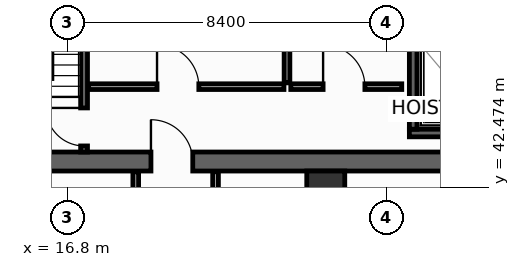
"""IFC4 building model, lengths in metres.
Left out: names, types, materials, properties, quantities, classifications, styles, units other than length and angle.
Written with IfcOpenShell. Run it as: python <this file> out.ifc"""

import sys

from ifc_helpers import new_model, si_unit, direction, frame, frame_2d, origin, origin_2d, place, context, subcontext, project, spatial, rectangle, hollow_rectangle, extrude, element, fill, save


model = new_model("IFC4")
c1 = context("Model", 3, precision=1e-05, world=origin(), true_north=direction((0.0, 1.0)))
c2 = subcontext(c1, "Body", "Model", "MODEL_VIEW")
j1 = project(units=[si_unit("LENGTHUNIT", "METRE"), si_unit("PLANEANGLEUNIT", "RADIAN")], contexts=[c1])
p1 = place(None, origin())
s1 = spatial("IfcSite", under=j1, at=p1, CompositionType="ELEMENT")
p2 = place(p1, origin())
s2 = spatial("IfcBuilding", under=s1, at=p2, CompositionType="ELEMENT")
p3 = place(p2, frame((0.0, 0.0, 137.2)))
s3 = spatial("IfcBuildingStorey", under=s2, at=p3, CompositionType="ELEMENT", Elevation=137.2)
p4 = place(p3, frame((13.6, 43.15, 0.0), z_axis=(0.0, 0.0, 1.0), x_axis=(1.0, 0.0, 0.0)))
e1 = element("IfcWall", 1, at=p4, inside=s3, PredefinedType="SHEAR", context=c2, shape_type="SweptSolid", body=[
    extrude(rectangle(XDim=32.7, YDim=0.5, at=frame_2d((16.35, 0.0))), origin(), (0.0, 0.0, 1.0), 3.55),
])
p5 = place(p4, frame((5.4, 0.0, 0.0)))
e2 = element("IfcOpeningElement", 2, at=p5, cuts=e1, PredefinedType="OPENING", context=c2, shape_type="SweptSolid", body=[
    extrude(rectangle(XDim=1.1, YDim=2.15, at=frame_2d((0.55, 1.075))), frame((0.0, 0.26, 0.0), z_axis=(0.0, -1.0, 0.0), x_axis=(1.0, 0.0, 0.0)), (0.0, 0.0, 1.0), 0.52),
])
p6 = place(p4, frame((25.6, 0.0, 0.0)))
e3 = element("IfcOpeningElement", 3, at=p6, cuts=e1, PredefinedType="OPENING", context=c2, shape_type="SweptSolid", body=[
    extrude(rectangle(XDim=1.1, YDim=2.15, at=frame_2d((0.55, 1.075))), frame((0.0, 0.26, 0.0), z_axis=(0.0, -1.0, 0.0), x_axis=(1.0, 0.0, 0.0)), (0.0, 0.0, 1.0), 0.52),
])
p7 = place(p3, frame((23.6, 42.4, 0.0), z_axis=(0.0, 0.0, 1.0), x_axis=(1.0, 0.0, 0.0)))
e4 = element("IfcColumn", 4, at=p7, inside=s3, PredefinedType="COLUMN", context=c2, shape_type="SweptSolid", body=[
    extrude(hollow_rectangle(XDim=1.0, YDim=1.0, WallThickness=0.045, at=origin_2d()), origin(), (0.0, 0.0, 1.0), 3.8),
])
p8 = place(p3, frame((25.8, 43.9, 0.0), z_axis=(0.0, 0.0, 1.0), x_axis=(1.0, 0.0, 0.0)))
e5 = element("IfcWall", 5, at=p8, inside=s3, PredefinedType="SHEAR", context=c2, shape_type="SweptSolid", body=[
    extrude(rectangle(XDim=2.575, YDim=0.2, at=frame_2d((1.288, 0.0))), origin(), (0.0, 0.0, 1.0), 3.55),
])
p9 = place(p3, frame((25.9, 44.0, 0.0), z_axis=(0.0, 0.0, 1.0), x_axis=(0.0, 1.0, 0.0)))
e6 = element("IfcWall", 6, at=p9, inside=s3, PredefinedType="SHEAR", context=c2, shape_type="SweptSolid", body=[
    extrude(rectangle(XDim=2.3, YDim=0.2, at=frame_2d((1.15, 0.0))), origin(), (0.0, 0.0, 1.0), 3.55),
])
p10 = place(p3, frame((17.24, 43.4, 0.0), z_axis=(0.0, 0.0, 1.0), x_axis=(0.0, 1.0, 0.0)))
e7 = element("IfcWall", 7, at=p10, inside=s3, PredefinedType="SHEAR", context=c2, shape_type="SweptSolid", body=[
    extrude(rectangle(XDim=10.4, YDim=0.18, at=frame_2d((5.2, 0.0))), origin(), (0.0, 0.0, 1.0), 3.55),
])
p11 = place(p10, frame((0.16, 0.0, 0.0)))
e8 = element("IfcOpeningElement", 8, at=p11, cuts=e7, PredefinedType="OPENING", context=c2, shape_type="SweptSolid", body=[
    extrude(rectangle(XDim=1.0, YDim=2.15, at=frame_2d((0.5, 1.075))), frame((0.0, 0.1, 0.0), z_axis=(0.0, -1.0, 0.0), x_axis=(1.0, 0.0, 0.0)), (0.0, 0.0, 1.0), 0.2),
])
p12 = place(p3, frame((17.36, 45.12, 0.0), z_axis=(0.0, 0.0, 1.0), x_axis=(1.0, 0.0, 0.0)))
e9 = element("IfcWall", 9, at=p12, inside=s3, PredefinedType="PARTITIONING", context=c2, shape_type="SweptSolid", body=[
    extrude(rectangle(XDim=5.14, YDim=0.15, at=frame_2d((2.57, 0.0))), origin(), (0.0, 0.0, 1.0), 3.55),
])
p13 = place(p12, frame((1.8, 0.0, 0.0)))
e10 = element("IfcOpeningElement", 10, at=p13, cuts=e9, PredefinedType="OPENING", context=c2, shape_type="SweptSolid", body=[
    extrude(rectangle(XDim=1.1, YDim=2.15, at=frame_2d((0.55, 1.075))), frame((0.0, 0.085, 0.0), z_axis=(0.0, -1.0, 0.0), x_axis=(1.0, 0.0, 0.0)), (0.0, 0.0, 1.0), 0.17),
])
p14 = place(p3, frame((22.58, 50.55, 0.0), z_axis=(0.0, 0.0, 1.0), x_axis=(0.0, -1.0, 0.0)))
e11 = element("IfcWall", 11, at=p14, inside=s3, PredefinedType="PARTITIONING", context=c2, shape_type="SweptSolid", body=[
    extrude(rectangle(XDim=5.33, YDim=0.15, at=frame_2d((2.665, 0.0))), origin(), (0.0, 0.0, 1.0), 3.55),
])
p15 = place(p14, frame((1.8, 0.0, 0.0)))
e12 = element("IfcOpeningElement", 12, at=p15, cuts=e11, PredefinedType="OPENING", context=c2, shape_type="SweptSolid", body=[
    extrude(rectangle(XDim=1.1, YDim=2.15, at=frame_2d((0.55, 1.075))), frame((0.0, 0.085, 0.0), z_axis=(0.0, -1.0, 0.0), x_axis=(1.0, 0.0, 0.0)), (0.0, 0.0, 1.0), 0.17),
])
p16 = place(p3, frame((22.68, 45.12, 0.0), z_axis=(0.0, 0.0, 1.0), x_axis=(1.0, 0.0, 0.0)))
e13 = element("IfcWall", 13, at=p16, inside=s3, PredefinedType="PARTITIONING", context=c2, shape_type="SweptSolid", body=[
    extrude(rectangle(XDim=2.92, YDim=0.15, at=frame_2d((1.46, 0.0))), origin(), (0.0, 0.0, 1.0), 3.55),
])
p17 = place(p16, frame((0.85, 0.0, 0.0)))
e14 = element("IfcOpeningElement", 14, at=p17, cuts=e13, PredefinedType="OPENING", context=c2, shape_type="SweptSolid", body=[
    extrude(rectangle(XDim=1.1, YDim=2.15, at=frame_2d((0.55, 1.075))), frame((0.0, 0.085, 0.0), z_axis=(0.0, -1.0, 0.0), x_axis=(1.0, 0.0, 0.0)), (0.0, 0.0, 1.0), 0.17),
])
for number, where, z_axis, x_axis in (
    (15, (18.6, 40.75, 0.0), (0.0, 0.0, 1.0), (0.0, 1.0, 0.0)),
    (16, (20.7, 40.75, 0.0), (0.0, 0.0, 1.0), (0.0, 1.0, 0.0)),
):
    element("IfcWall", number, at=place(p3, frame(where, z_axis=z_axis, x_axis=x_axis)), inside=s3, PredefinedType="PARTITIONING", context=c2, shape_type="SweptSolid", body=[
        extrude(rectangle(XDim=2.13, YDim=0.15, at=frame_2d((1.065, 0.0))), origin(), (0.0, 0.0, 1.0), 3.55),
    ])
p18 = place(p11, origin())
e17 = element("IfcDoor", 17, at=p18, inside=s3, OperationType="SINGLE_SWING_RIGHT", PredefinedType="DOOR", context=c2, shape_type="SweptSolid", body=[
    extrude(rectangle(XDim=1.0, YDim=2.15, at=frame_2d((0.5, 1.075))), frame((0.0, 0.025, 0.0), z_axis=(0.0, -1.0, 0.0), x_axis=(1.0, 0.0, 0.0)), (0.0, 0.0, 1.0), 0.05),
])
fill(e8, e17)
p19 = place(p13, origin())
e18 = element("IfcDoor", 18, at=p19, inside=s3, OperationType="SINGLE_SWING_LEFT", PredefinedType="DOOR", context=c2, shape_type="SweptSolid", body=[
    extrude(rectangle(XDim=1.1, YDim=2.15, at=frame_2d((0.55, 1.075))), frame((0.0, 0.025, 0.0), z_axis=(0.0, -1.0, 0.0), x_axis=(1.0, 0.0, 0.0)), (0.0, 0.0, 1.0), 0.05),
])
fill(e10, e18)
p20 = place(p17, origin())
e19 = element("IfcDoor", 19, at=p20, inside=s3, OperationType="SINGLE_SWING_LEFT", PredefinedType="DOOR", context=c2, shape_type="SweptSolid", body=[
    extrude(rectangle(XDim=1.1, YDim=2.15, at=frame_2d((0.55, 1.075))), frame((0.0, 0.025, 0.0), z_axis=(0.0, -1.0, 0.0), x_axis=(1.0, 0.0, 0.0)), (0.0, 0.0, 1.0), 0.05),
])
fill(e14, e19)
p21 = place(p5, origin())
e20 = element("IfcDoor", 20, at=p21, inside=s3, OperationType="SINGLE_SWING_LEFT", PredefinedType="DOOR", context=c2, shape_type="SweptSolid", body=[
    extrude(rectangle(XDim=1.1, YDim=2.15, at=frame_2d((0.55, 1.075))), frame((0.0, 0.025, 0.0), z_axis=(0.0, -1.0, 0.0), x_axis=(1.0, 0.0, 0.0)), (0.0, 0.0, 1.0), 0.05),
])
fill(e2, e20)
save(model, sys.argv[1])
